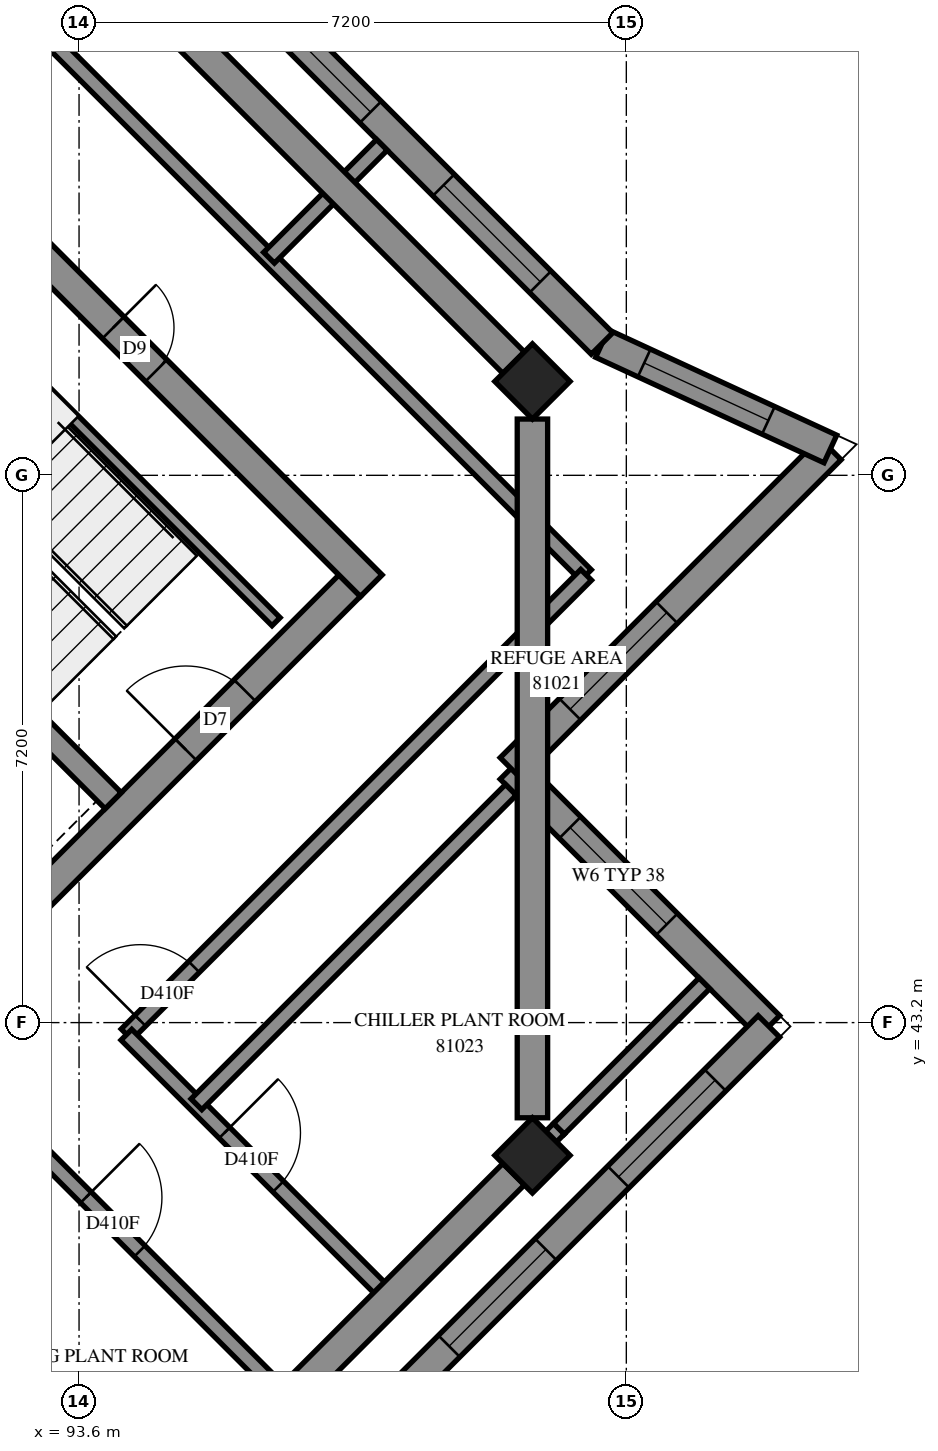
"""IFC4 building model, lengths in metres.
Left out: names, types, materials, properties, quantities, classifications, styles, units other than length and angle.
Written with IfcOpenShell. Run it as: python <this file> out.ifc"""

import sys

from ifc_helpers import new_model, si_unit, direction, frame, frame_2d, origin, origin_2d, place, context, subcontext, project, spatial, polyline, rectangle, outline, extrude, element, fill, save


model = new_model("IFC4")
c1 = context("Model", 3, precision=1e-05, world=origin(), true_north=direction((0.0, 1.0)))
c2 = subcontext(c1, "Body", "Model", "MODEL_VIEW")
j1 = project(units=[si_unit("LENGTHUNIT", "METRE"), si_unit("PLANEANGLEUNIT", "RADIAN")], contexts=[c1])
p1 = place(None, origin())
s1 = spatial("IfcSite", under=j1, at=p1, CompositionType="ELEMENT")
p2 = place(p1, origin())
s2 = spatial("IfcBuilding", under=s1, at=p2, CompositionType="ELEMENT")
p3 = place(p2, frame((0.0, 0.0, 298.2)))
s3 = spatial("IfcBuildingStorey", under=s2, at=p3, CompositionType="ELEMENT", Elevation=298.2)
for number, where, z_axis, x_axis in (
    (1, (99.565, 51.635, 0.0), (0.0, 0.0, 1.0), (0.707, -0.707, 0.0)),
    (2, (99.565, 41.453, 0.0), (0.0, 0.0, 1.0), (0.707, -0.707, 0.0)),
):
    element("IfcColumn", number, at=place(p3, frame(where, z_axis=z_axis, x_axis=x_axis)), inside=s3, PredefinedType="COLUMN", context=c2, shape_type="SweptSolid", body=[
        extrude(rectangle(XDim=0.7, YDim=0.7, at=origin_2d()), origin(), (0.0, 0.0, 1.0), 3.5),
    ])
p4 = place(p3, frame((86.695, 59.696, -0.3), z_axis=(0.0, 0.0, 1.0), x_axis=(0.7071100706, -0.7071034917, 0.0)))
e3 = element("IfcWall", 3, at=p4, inside=s3, PredefinedType="SHEAR", context=c2, shape_type="SweptSolid", body=[
    extrude(outline(polyline([(0.0, 0.0), (15.2, 0.0), (15.2, 3.1), (0.0, 3.1), (0.0, 0.0)])), frame((0.0, 0.2, 0.0), z_axis=(0.0, -1.0, 0.0), x_axis=(1.0, 0.0, 0.0)), (0.0, 0.0, 1.0), 0.4),
])
p5 = place(p4, frame((10.4, 0.0, 0.3)))
e4 = element("IfcOpeningElement", 4, at=p5, cuts=e3, PredefinedType="OPENING", context=c2, shape_type="SweptSolid", body=[
    extrude(rectangle(XDim=0.8, YDim=2.1, at=frame_2d((0.4, 1.05))), frame((0.0, 0.21, 0.0), z_axis=(0.0, -1.0, 0.0), x_axis=(1.0, 0.0, 0.0)), (0.0, 0.0, 1.0), 0.42),
])
p6 = place(p3, frame((89.17, 40.958, -0.3), z_axis=(0.0, 0.0, 1.0), x_axis=(0.7071067812, 0.7071067812, 0.0)))
e5 = element("IfcWall", 5, at=p6, inside=s3, PredefinedType="SHEAR", context=c2, shape_type="SweptSolid", body=[
    extrude(outline(polyline([(0.0, 0.0), (11.3, 0.0), (11.3, 3.1), (0.0, 3.1), (0.0, 0.0)])), frame((0.0, 0.2, 0.0), z_axis=(0.0, -1.0, 0.0), x_axis=(1.0, 0.0, 0.0)), (0.0, 0.0, 1.0), 0.4),
])
p7 = place(p6, frame((1.45, 0.0, 0.3)))
e6 = element("IfcOpeningElement", 6, at=p7, cuts=e5, PredefinedType="OPENING", context=c2, shape_type="SweptSolid", body=[
    extrude(rectangle(XDim=1.1, YDim=2.1, at=frame_2d((0.55, 1.05))), frame((0.0, 0.21, 0.0), z_axis=(0.0, -1.0, 0.0), x_axis=(1.0, 0.0, 0.0)), (0.0, 0.0, 1.0), 0.42),
])
p8 = place(p6, frame((8.25, 0.0, 0.3)))
e7 = element("IfcOpeningElement", 7, at=p8, cuts=e5, PredefinedType="OPENING", context=c2, shape_type="SweptSolid", body=[
    extrude(rectangle(XDim=1.1, YDim=2.1, at=frame_2d((0.55, 1.05))), frame((0.0, 0.21, 0.0), z_axis=(0.0, -1.0, 0.0), x_axis=(1.0, 0.0, 0.0)), (0.0, 0.0, 1.0), 0.42),
])
p9 = place(p3, frame((88.958, 51.211, 0.0), z_axis=(0.0, 0.0, 1.0), x_axis=(0.7070998367, -0.7071137256, 0.0)))
e8 = element("IfcWall", 8, at=p9, inside=s3, PredefinedType="SOLIDWALL", context=c2, shape_type="SweptSolid", body=[
    extrude(outline(polyline([(0.0, 0.0), (7.2, 0.0), (7.2, 3.5), (0.0, 3.5), (0.0, 0.0)])), frame((0.0, 0.15, 0.0), z_axis=(0.0, -1.0, 0.0), x_axis=(1.0, 0.0, 0.0)), (0.0, 0.0, 1.0), 0.3),
])
p10 = place(p3, frame((102.676, 43.15, 0.0), z_axis=(0.0, 0.0, 1.0), x_axis=(-0.7070963646, 0.7071171977, 0.0)))
e9 = element("IfcWall", 9, at=p10, inside=s3, PredefinedType="SOLIDWALL", context=c2, shape_type="SweptSolid", body=[
    extrude(outline(polyline([(-0.2, -0.2), (4.6, -0.2), (5.0, 0.2), (0.2, 0.2), (-0.2, -0.2)])), origin(), (0.0, 0.0, 1.0), 3.5),
])
p11 = place(p10, frame((1.9, 0.0, 0.7)))
e10 = element("IfcOpeningElement", 10, at=p11, cuts=e9, PredefinedType="OPENING", context=c2, shape_type="SweptSolid", body=[
    extrude(rectangle(XDim=1.8, YDim=2.2, at=frame_2d((0.9, 1.1))), frame((0.0, 0.21, 0.0), z_axis=(0.0, -1.0, 0.0), x_axis=(1.0, 0.0, 0.0)), (0.0, 0.0, 1.0), 0.42),
])
p12 = place(p3, frame((99.282, 46.544, 0.0), z_axis=(0.0, 0.0, 1.0), x_axis=(0.7071067812, 0.7071067812, 0.0)))
e11 = element("IfcWall", 11, at=p12, inside=s3, PredefinedType="SOLIDWALL", context=c2, shape_type="SweptSolid", body=[
    extrude(outline(polyline([(0.2, -0.2), (6.23, -0.2), (5.657, 0.2), (-0.2, 0.2), (0.2, -0.2)])), origin(), (0.0, 0.0, 1.0), 3.5),
])
p13 = place(p12, frame((1.1, 0.0, 0.7)))
e12 = element("IfcOpeningElement", 12, at=p13, cuts=e11, PredefinedType="OPENING", context=c2, shape_type="SweptSolid", body=[
    extrude(rectangle(XDim=1.8, YDim=2.2, at=frame_2d((0.9, 1.1))), frame((0.0, 0.21, 0.0), z_axis=(0.0, -1.0, 0.0), x_axis=(1.0, 0.0, 0.0)), (0.0, 0.0, 1.0), 0.42),
])
p14 = place(p3, frame((103.484, 50.747, 0.0), z_axis=(0.0, 0.0, 1.0), x_axis=(-0.9078558767, 0.4192823716, 0.0)))
e13 = element("IfcWall", 13, at=p14, inside=s3, PredefinedType="SOLIDWALL", context=c2, shape_type="SweptSolid", body=[
    extrude(outline(polyline([(-0.287, -0.2), (3.273, -0.2), (3.345, 0.2), (0.287, 0.2), (-0.287, -0.2)])), origin(), (0.0, 0.0, 1.0), 3.5),
])
p15 = place(p14, frame((0.898, 0.0, 0.7)))
e14 = element("IfcOpeningElement", 14, at=p15, cuts=e13, PredefinedType="OPENING", context=c2, shape_type="SweptSolid", body=[
    extrude(rectangle(XDim=1.8, YDim=2.2, at=frame_2d((0.9, 1.1))), frame((0.0, 0.21, 0.0), z_axis=(0.0, -1.0, 0.0), x_axis=(1.0, 0.0, 0.0)), (0.0, 0.0, 1.0), 0.42),
])
p16 = place(p3, frame((100.48, 52.134, 0.0), z_axis=(0.0, 0.0, 1.0), x_axis=(-0.7071067812, 0.7071067812, 0.0)))
e15 = element("IfcWall", 15, at=p16, inside=s3, PredefinedType="SOLIDWALL", context=c2, shape_type="SweptSolid", body=[
    extrude(outline(polyline([(0.036, -0.2), (6.718, -0.2), (6.718, 0.2), (-0.036, 0.2), (0.036, -0.2)])), origin(), (0.0, 0.0, 1.0), 3.5),
])
p17 = place(p16, frame((1.147, 0.0, 0.7)))
e16 = element("IfcOpeningElement", 16, at=p17, cuts=e15, PredefinedType="OPENING", context=c2, shape_type="SweptSolid", body=[
    extrude(rectangle(XDim=1.8, YDim=2.2, at=frame_2d((0.9, 1.1))), frame((0.0, 0.21, 0.0), z_axis=(0.0, -1.0, 0.0), x_axis=(1.0, 0.0, 0.0)), (0.0, 0.0, 1.0), 0.42),
])
p18 = place(p16, frame((4.306, 0.0, 0.7)))
e17 = element("IfcOpeningElement", 17, at=p18, cuts=e15, PredefinedType="OPENING", context=c2, shape_type="SweptSolid", body=[
    extrude(rectangle(XDim=1.8, YDim=2.2, at=frame_2d((0.9, 1.1))), frame((0.0, 0.21, 0.0), z_axis=(0.0, -1.0, 0.0), x_axis=(1.0, 0.0, 0.0)), (0.0, 0.0, 1.0), 0.42),
])
p19 = place(p3, frame((84.291, 45.13, 0.0), z_axis=(0.0, 0.0, 1.0), x_axis=(0.7071067812, -0.7071067812, 0.0)))
e18 = element("IfcWall", 18, at=p19, inside=s3, PredefinedType="SOLIDWALL", context=c2, shape_type="SweptSolid", body=[
    extrude(outline(polyline([(-0.2, -0.2), (14.6, -0.2), (14.2, 0.2), (-0.2, 0.2), (-0.2, -0.2)])), origin(), (0.0, 0.0, 1.0), 3.5),
])
p20 = place(p19, frame((0.5, 0.0, 0.7)))
e19 = element("IfcOpeningElement", 19, at=p20, cuts=e18, PredefinedType="OPENING", context=c2, shape_type="SweptSolid", body=[
    extrude(rectangle(XDim=1.8, YDim=2.2, at=frame_2d((0.9, 1.1))), frame((0.0, 0.21, 0.0), z_axis=(0.0, -1.0, 0.0), x_axis=(1.0, 0.0, 0.0)), (0.0, 0.0, 1.0), 0.42),
])
p21 = place(p19, frame((3.5, 0.0, 0.7)))
e20 = element("IfcOpeningElement", 20, at=p21, cuts=e18, PredefinedType="OPENING", context=c2, shape_type="SweptSolid", body=[
    extrude(rectangle(XDim=1.8, YDim=2.2, at=frame_2d((0.9, 1.1))), frame((0.0, 0.21, 0.0), z_axis=(0.0, -1.0, 0.0), x_axis=(1.0, 0.0, 0.0)), (0.0, 0.0, 1.0), 0.42),
])
p22 = place(p19, frame((6.55, 0.0, 0.7)))
e21 = element("IfcOpeningElement", 21, at=p22, cuts=e18, PredefinedType="OPENING", context=c2, shape_type="SweptSolid", body=[
    extrude(rectangle(XDim=1.8, YDim=2.2, at=frame_2d((0.9, 1.1))), frame((0.0, 0.21, 0.0), z_axis=(0.0, -1.0, 0.0), x_axis=(1.0, 0.0, 0.0)), (0.0, 0.0, 1.0), 0.42),
])
p23 = place(p19, frame((10.7, 0.0, 0.7)))
e22 = element("IfcOpeningElement", 22, at=p23, cuts=e18, PredefinedType="OPENING", context=c2, shape_type="SweptSolid", body=[
    extrude(rectangle(XDim=1.8, YDim=2.2, at=frame_2d((0.9, 1.1))), frame((0.0, 0.21, 0.0), z_axis=(0.0, -1.0, 0.0), x_axis=(1.0, 0.0, 0.0)), (0.0, 0.0, 1.0), 0.42),
])
p24 = place(p3, frame((94.474, 34.948, 0.0), z_axis=(0.0, 0.0, 1.0), x_axis=(0.7071110915, 0.7071024708, 0.0)))
e23 = element("IfcWall", 23, at=p24, inside=s3, PredefinedType="SOLIDWALL", context=c2, shape_type="SweptSolid", body=[
    extrude(outline(polyline([(-0.2, -0.2), (11.8, -0.2), (11.4, 0.2), (0.2, 0.2), (-0.2, -0.2)])), origin(), (0.0, 0.0, 1.0), 3.5),
])
p25 = place(p24, frame((1.75, 0.0, 0.7)))
e24 = element("IfcOpeningElement", 24, at=p25, cuts=e23, PredefinedType="OPENING", context=c2, shape_type="SweptSolid", body=[
    extrude(rectangle(XDim=1.8, YDim=2.2, at=frame_2d((0.9, 1.1))), frame((0.0, 0.21, 0.0), z_axis=(0.0, -1.0, 0.0), x_axis=(1.0, 0.0, 0.0)), (0.0, 0.0, 1.0), 0.42),
])
p26 = place(p24, frame((5.65, 0.0, 0.7)))
e25 = element("IfcOpeningElement", 25, at=p26, cuts=e23, PredefinedType="OPENING", context=c2, shape_type="SweptSolid", body=[
    extrude(rectangle(XDim=1.8, YDim=2.2, at=frame_2d((0.9, 1.1))), frame((0.0, 0.21, 0.0), z_axis=(0.0, -1.0, 0.0), x_axis=(1.0, 0.0, 0.0)), (0.0, 0.0, 1.0), 0.42),
])
p27 = place(p24, frame((8.8, 0.0, 0.7)))
e26 = element("IfcOpeningElement", 26, at=p27, cuts=e23, PredefinedType="OPENING", context=c2, shape_type="SweptSolid", body=[
    extrude(rectangle(XDim=1.8, YDim=2.2, at=frame_2d((0.9, 1.1))), frame((0.0, 0.21, 0.0), z_axis=(0.0, -1.0, 0.0), x_axis=(1.0, 0.0, 0.0)), (0.0, 0.0, 1.0), 0.42),
])
p28 = place(p3, frame((91.313, 53.354, 0.0), z_axis=(0.0, 0.0, 1.0), x_axis=(0.7071140275, -0.7070995348, 0.0)))
e27 = element("IfcWall", 27, at=p28, inside=s3, PredefinedType="PARTITIONING", context=c2, shape_type="SweptSolid", body=[
    extrude(outline(polyline([(0.0, 0.0), (6.9, 0.0), (6.9, 3.5), (0.0, 3.5), (0.0, 0.0)])), frame((0.0, 0.075, 0.0), z_axis=(0.0, -1.0, 0.0), x_axis=(1.0, 0.0, 0.0)), (0.0, 0.0, 1.0), 0.15),
])
p29 = place(p3, frame((100.269, 49.087, 0.0), z_axis=(0.0, 0.0, 1.0), x_axis=(-0.7071525817, 0.7070609777, 0.0)))
e28 = element("IfcWall", 28, at=p29, inside=s3, PredefinedType="PARTITIONING", context=c2, shape_type="SweptSolid", body=[
    extrude(rectangle(XDim=13.1, YDim=0.2, at=frame_2d((6.55, 0.0))), origin(), (0.0, 0.0, 1.0), 3.5),
])
p30 = place(p29, frame((10.029, 0.0, 0.0)))
e29 = element("IfcOpeningElement", 29, at=p30, cuts=e28, PredefinedType="OPENING", context=c2, shape_type="SweptSolid", body=[
    extrude(rectangle(XDim=1.0, YDim=2.1, at=frame_2d((0.5, 1.05))), frame((0.0, 0.11, 0.0), z_axis=(0.0, -1.0, 0.0), x_axis=(1.0, 0.0, 0.0)), (0.0, 0.0, 1.0), 0.22),
])
p31 = place(p3, frame((94.225, 43.045, 0.0), z_axis=(0.0, 0.0, 1.0), x_axis=(0.7071067812, 0.7071067812, 0.0)))
e30 = element("IfcWall", 30, at=p31, inside=s3, PredefinedType="PARTITIONING", context=c2, shape_type="SweptSolid", body=[
    extrude(rectangle(XDim=8.55, YDim=0.2, at=frame_2d((4.275, 0.0))), origin(), (0.0, 0.0, 1.0), 3.5),
])
p32 = place(p31, frame((0.256, 0.0, 0.0)))
e31 = element("IfcOpeningElement", 31, at=p32, cuts=e30, PredefinedType="OPENING", context=c2, shape_type="SweptSolid", body=[
    extrude(rectangle(XDim=1.0, YDim=2.1, at=frame_2d((0.5, 1.05))), frame((0.0, 0.11, 0.0), z_axis=(0.0, -1.0, 0.0), x_axis=(1.0, 0.0, 0.0)), (0.0, 0.0, 1.0), 0.22),
])
p33 = place(p3, frame((92.887, 41.703, 0.0), z_axis=(0.0, 0.0, 1.0), x_axis=(0.7071067812, -0.7071067812, 0.0)))
e32 = element("IfcWall", 32, at=p33, inside=s3, PredefinedType="PARTITIONING", context=c2, shape_type="SweptSolid", body=[
    extrude(rectangle(XDim=4.899, YDim=0.2, at=frame_2d((2.449, 0.0))), origin(), (0.0, 0.0, 1.0), 3.5),
])
p34 = place(p33, frame((1.136, 0.0, 0.0)))
e33 = element("IfcOpeningElement", 33, at=p34, cuts=e32, PredefinedType="OPENING", context=c2, shape_type="SweptSolid", body=[
    extrude(rectangle(XDim=1.0, YDim=2.1, at=frame_2d((0.5, 1.05))), frame((0.0, 0.11, 0.0), z_axis=(0.0, -1.0, 0.0), x_axis=(1.0, 0.0, 0.0)), (0.0, 0.0, 1.0), 0.22),
])
p35 = place(p3, frame((94.223, 43.041, 0.0), z_axis=(0.0, 0.0, 1.0), x_axis=(0.7071067812, -0.7071067812, 0.0)))
e34 = element("IfcWall", 34, at=p35, inside=s3, PredefinedType="PARTITIONING", context=c2, shape_type="SweptSolid", body=[
    extrude(rectangle(XDim=4.899, YDim=0.2, at=frame_2d((2.449, 0.0))), origin(), (0.0, 0.0, 1.0), 3.5),
])
p36 = place(p35, frame((1.825, 0.0, 0.0)))
e35 = element("IfcOpeningElement", 35, at=p36, cuts=e34, PredefinedType="OPENING", context=c2, shape_type="SweptSolid", body=[
    extrude(rectangle(XDim=1.0, YDim=2.1, at=frame_2d((0.5, 1.05))), frame((0.0, 0.11, 0.0), z_axis=(0.0, -1.0, 0.0), x_axis=(1.0, 0.0, 0.0)), (0.0, 0.0, 1.0), 0.22),
])
p37 = place(p3, frame((97.69, 39.58, 0.0), z_axis=(0.0, 0.0, 1.0), x_axis=(0.7071067812, 0.7071067812, 0.0)))
e36 = element("IfcWall", 36, at=p37, inside=s3, PredefinedType="PARTITIONING", context=c2, shape_type="SweptSolid", body=[
    extrude(rectangle(XDim=3.145, YDim=0.2, at=frame_2d((1.573, 0.0))), origin(), (0.0, 0.0, 1.0), 3.0),
])
p38 = place(p3, frame((96.346, 38.238, 0.0), z_axis=(0.0, 0.0, 1.0), x_axis=(0.7065800724, 0.7076330979, 0.0)))
e37 = element("IfcWall", 37, at=p38, inside=s3, PredefinedType="PARTITIONING", context=c2, shape_type="SweptSolid", body=[
    extrude(rectangle(XDim=1.899, YDim=0.2, at=frame_2d((0.95, 0.0))), origin(), (0.0, 0.0, 1.0), 3.0),
])
p39 = place(p3, frame((95.144, 42.126, 0.0), z_axis=(0.0, 0.0, 1.0), x_axis=(0.7071067812, 0.7071067812, 0.0)))
e38 = element("IfcWall", 38, at=p39, inside=s3, PredefinedType="PARTITIONING", context=c2, shape_type="SweptSolid", body=[
    extrude(outline(polyline([(0.0, -0.1), (5.85, -0.1), (5.85, 0.1), (0.0, 0.1), (0.0, -0.1)])), origin(), (0.0, 0.0, 1.0), 3.5),
])
p40 = place(p3, frame((99.914, 41.804, 0.0), z_axis=(0.0, 0.0, 1.0), x_axis=(0.7071067812, 0.7071067812, 0.0)))
e39 = element("IfcWall", 39, at=p40, inside=s3, PredefinedType="PARTITIONING", context=c2, shape_type="SweptSolid", body=[
    extrude(outline(polyline([(0.0, -0.1), (2.705, -0.1), (2.705, 0.1), (0.0, 0.1), (0.0, -0.1)])), origin(), (0.0, 0.0, 1.0), 3.5),
])
p41 = place(p3, frame((96.099, 53.263, 0.0), z_axis=(0.0, 0.0, 1.0), x_axis=(0.7071067812, 0.7071067812, 0.0)))
e40 = element("IfcWall", 40, at=p41, inside=s3, PredefinedType="PARTITIONING", context=c2, shape_type="SweptSolid", body=[
    extrude(outline(polyline([(0.0, -0.1), (2.1, -0.1), (2.1, 0.1), (0.0, 0.1), (0.0, -0.1)])), origin(), (0.0, 0.0, 1.0), 3.5),
])
p42 = place(p11, origin())
e41 = element("IfcWindow", 41, at=p42, inside=s3, PartitioningType="SINGLE_PANEL", PredefinedType="WINDOW", context=c2, shape_type="SweptSolid", body=[
    extrude(rectangle(XDim=1.8, YDim=2.2, at=frame_2d((0.9, 1.1))), frame((0.0, 0.08, 0.0), z_axis=(0.0, -1.0, 0.0), x_axis=(1.0, 0.0, 0.0)), (0.0, 0.0, 1.0), 0.06),
])
fill(e10, e41)
p43 = place(p13, origin())
e42 = element("IfcWindow", 42, at=p43, inside=s3, PartitioningType="SINGLE_PANEL", PredefinedType="WINDOW", context=c2, shape_type="SweptSolid", body=[
    extrude(rectangle(XDim=1.8, YDim=2.2, at=frame_2d((0.9, 1.1))), frame((0.0, 0.08, 0.0), z_axis=(0.0, -1.0, 0.0), x_axis=(1.0, 0.0, 0.0)), (0.0, 0.0, 1.0), 0.06),
])
fill(e12, e42)
p44 = place(p15, origin())
e43 = element("IfcWindow", 43, at=p44, inside=s3, PartitioningType="SINGLE_PANEL", PredefinedType="WINDOW", context=c2, shape_type="SweptSolid", body=[
    extrude(rectangle(XDim=1.8, YDim=2.2, at=frame_2d((0.9, 1.1))), frame((0.0, 0.08, 0.0), z_axis=(0.0, -1.0, 0.0), x_axis=(1.0, 0.0, 0.0)), (0.0, 0.0, 1.0), 0.06),
])
fill(e14, e43)
p45 = place(p17, origin())
e44 = element("IfcWindow", 44, at=p45, inside=s3, PartitioningType="SINGLE_PANEL", PredefinedType="WINDOW", context=c2, shape_type="SweptSolid", body=[
    extrude(rectangle(XDim=1.8, YDim=2.2, at=frame_2d((0.9, 1.1))), frame((0.0, 0.08, 0.0), z_axis=(0.0, -1.0, 0.0), x_axis=(1.0, 0.0, 0.0)), (0.0, 0.0, 1.0), 0.06),
])
fill(e16, e44)
p46 = place(p18, origin())
e45 = element("IfcWindow", 45, at=p46, inside=s3, PartitioningType="SINGLE_PANEL", PredefinedType="WINDOW", context=c2, shape_type="SweptSolid", body=[
    extrude(rectangle(XDim=1.8, YDim=2.2, at=frame_2d((0.9, 1.1))), frame((0.0, 0.08, 0.0), z_axis=(0.0, -1.0, 0.0), x_axis=(1.0, 0.0, 0.0)), (0.0, 0.0, 1.0), 0.06),
])
fill(e17, e45)
p47 = place(p26, origin())
e46 = element("IfcWindow", 46, at=p47, inside=s3, PartitioningType="SINGLE_PANEL", PredefinedType="WINDOW", context=c2, shape_type="SweptSolid", body=[
    extrude(rectangle(XDim=1.8, YDim=2.2, at=frame_2d((0.9, 1.1))), frame((0.0, 0.08, 0.0), z_axis=(0.0, -1.0, 0.0), x_axis=(1.0, 0.0, 0.0)), (0.0, 0.0, 1.0), 0.06),
])
fill(e25, e46)
p48 = place(p27, origin())
e47 = element("IfcWindow", 47, at=p48, inside=s3, PartitioningType="SINGLE_PANEL", PredefinedType="WINDOW", context=c2, shape_type="SweptSolid", body=[
    extrude(rectangle(XDim=1.8, YDim=2.2, at=frame_2d((0.9, 1.1))), frame((0.0, 0.08, 0.0), z_axis=(0.0, -1.0, 0.0), x_axis=(1.0, 0.0, 0.0)), (0.0, 0.0, 1.0), 0.06),
])
fill(e26, e47)
p49 = place(p5, origin())
e48 = element("IfcDoor", 48, at=p49, inside=s3, OperationType="SINGLE_SWING_RIGHT", PredefinedType="DOOR", context=c2, shape_type="SweptSolid", body=[
    extrude(rectangle(XDim=0.8, YDim=2.1, at=frame_2d((0.4, 1.05))), frame((0.0, 0.025, 0.0), z_axis=(0.0, -1.0, 0.0), x_axis=(1.0, 0.0, 0.0)), (0.0, 0.0, 1.0), 0.05),
])
fill(e4, e48)
p50 = place(p8, origin())
e49 = element("IfcDoor", 49, at=p50, inside=s3, OperationType="SINGLE_SWING_RIGHT", PredefinedType="DOOR", context=c2, shape_type="SweptSolid", body=[
    extrude(rectangle(XDim=1.1, YDim=2.1, at=frame_2d((0.55, 1.05))), frame((0.0, 0.025, 0.0), z_axis=(0.0, -1.0, 0.0), x_axis=(1.0, 0.0, 0.0)), (0.0, 0.0, 1.0), 0.05),
])
fill(e7, e49)
p51 = place(p32, origin())
e50 = element("IfcDoor", 50, at=p51, inside=s3, OperationType="SINGLE_SWING_RIGHT", PredefinedType="DOOR", context=c2, shape_type="SweptSolid", body=[
    extrude(rectangle(XDim=1.0, YDim=2.1, at=frame_2d((0.5, 1.05))), frame((0.0, 0.025, 0.0), z_axis=(0.0, -1.0, 0.0), x_axis=(1.0, 0.0, 0.0)), (0.0, 0.0, 1.0), 0.05),
])
fill(e31, e50)
p52 = place(p36, origin())
e51 = element("IfcDoor", 51, at=p52, inside=s3, OperationType="SINGLE_SWING_RIGHT", PredefinedType="DOOR", context=c2, shape_type="SweptSolid", body=[
    extrude(rectangle(XDim=1.0, YDim=2.1, at=frame_2d((0.5, 1.05))), frame((0.0, 0.025, 0.0), z_axis=(0.0, -1.0, 0.0), x_axis=(1.0, 0.0, 0.0)), (0.0, 0.0, 1.0), 0.05),
])
fill(e35, e51)
p53 = place(p34, origin())
e52 = element("IfcDoor", 52, at=p53, inside=s3, OperationType="SINGLE_SWING_LEFT", PredefinedType="DOOR", context=c2, shape_type="SweptSolid", body=[
    extrude(rectangle(XDim=1.0, YDim=2.1, at=frame_2d((0.5, 1.05))), frame((0.0, 0.025, 0.0), z_axis=(0.0, -1.0, 0.0), x_axis=(1.0, 0.0, 0.0)), (0.0, 0.0, 1.0), 0.05),
])
fill(e33, e52)
save(model, sys.argv[1])
